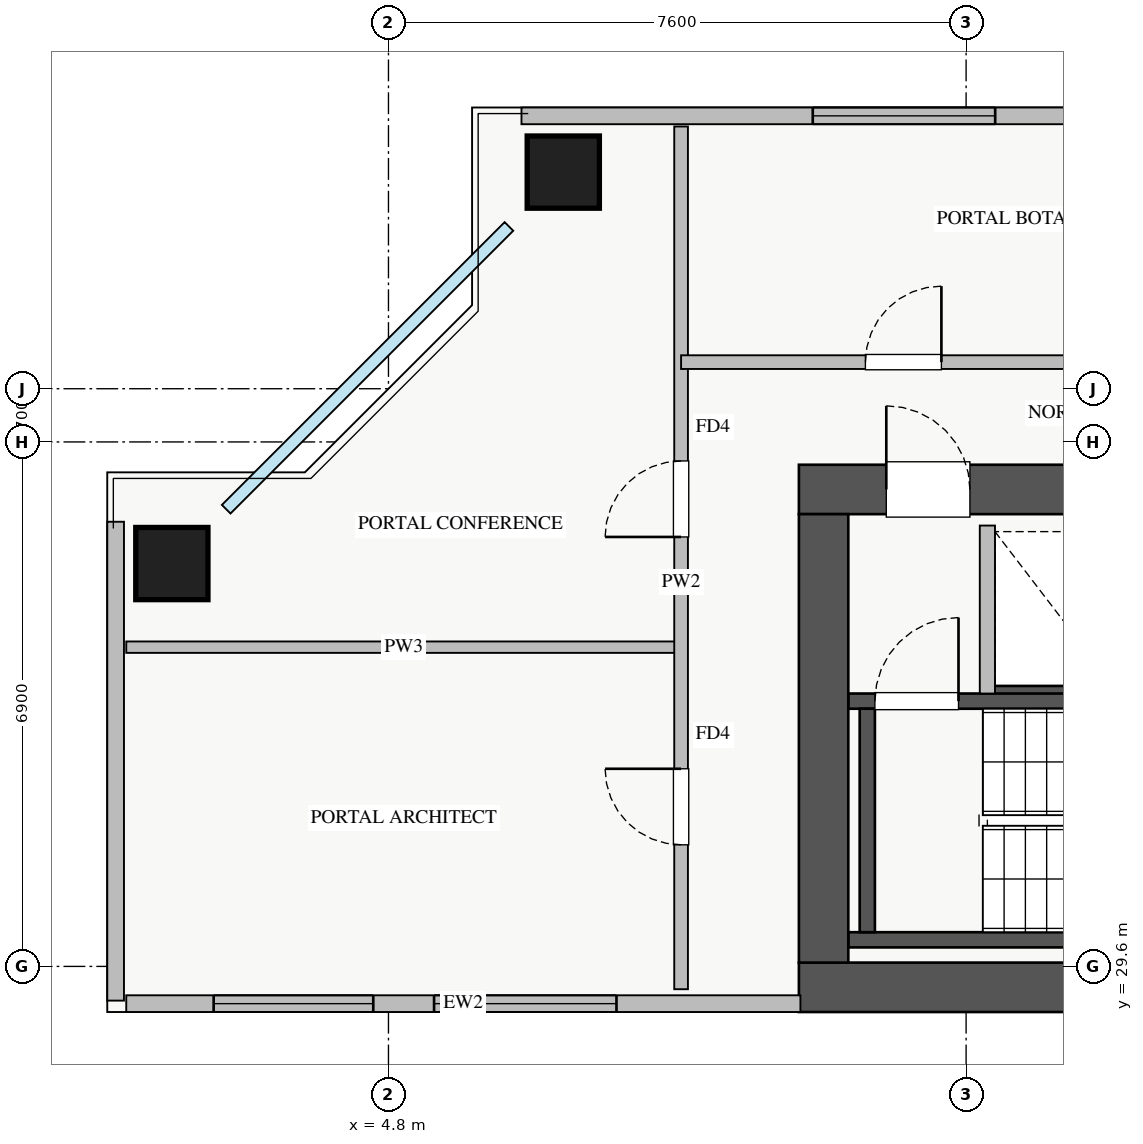
"""IFC4 building model, lengths in metres.
Left out: names, types, materials, properties, quantities, classifications, styles, units other than length and angle.
Written with IfcOpenShell. Run it as: python <this file> out.ifc"""

import sys

from ifc_helpers import new_model, si_unit, direction, frame, frame_2d, origin, origin_2d, place, context, subcontext, project, spatial, rectangle, extrude, source, transform, mapped, element, fill, save


model = new_model("IFC4")
c1 = context("Model", 3, precision=1e-05, world=origin(), true_north=direction((0.0, 1.0)))
c2 = subcontext(c1, "Body", "Model", "MODEL_VIEW")
j1 = project(units=[si_unit("LENGTHUNIT", "METRE"), si_unit("PLANEANGLEUNIT", "RADIAN")], contexts=[c1])
p1 = place(None, origin())
s1 = spatial("IfcSite", under=j1, at=p1, CompositionType="ELEMENT")
p2 = place(p1, origin())
s2 = spatial("IfcBuilding", under=s1, at=p2, CompositionType="ELEMENT")
p3 = place(p2, frame((0.0, 0.0, 166.5)))
s3 = spatial("IfcBuildingStorey", under=s2, at=p3, CompositionType="ELEMENT", Elevation=166.5)
p4 = place(p3, frame((12.68, 33.2, 0.0), z_axis=(0.0, 0.0, 1.0), x_axis=(1.0, 0.0, 0.0)))
e1 = element("IfcWall", 1, at=p4, inside=s3, PredefinedType="SHEAR", context=c2, shape_type="SweptSolid", body=[
    extrude(rectangle(XDim=1.94, YDim=0.18, at=frame_2d((0.97, 0.0))), origin(), (0.0, 0.0, 1.0), 3.07),
])
p5 = place(p3, frame((10.85, 29.95, 0.0), z_axis=(0.0, 0.0, 1.0), x_axis=(1.0, 0.0, 0.0)))
e2 = element("IfcWall", 2, at=p5, inside=s3, PredefinedType="SHEAR", context=c2, shape_type="SweptSolid", body=[
    extrude(rectangle(XDim=7.3, YDim=0.2, at=frame_2d((3.65, 0.0))), origin(), (0.0, 0.0, 1.0), 3.25),
])
p6 = place(p3, frame((10.85, 33.09, 0.0), z_axis=(0.0, 0.0, 1.0), x_axis=(1.0, 0.0, 0.0)))
e3 = element("IfcWall", 3, at=p6, inside=s3, PredefinedType="SHEAR", context=c2, shape_type="SweptSolid", body=[
    extrude(rectangle(XDim=7.3, YDim=0.2, at=frame_2d((3.65, 0.0))), origin(), (0.0, 0.0, 1.0), 3.25),
])
p7 = place(p6, frame((0.35, 0.0, 0.0)))
e4 = element("IfcOpeningElement", 4, at=p7, cuts=e3, PredefinedType="OPENING", context=c2, shape_type="SweptSolid", body=[
    extrude(rectangle(XDim=1.1, YDim=2.05, at=frame_2d((0.55, 1.025))), frame((0.0, 0.11, 0.0), z_axis=(0.0, -1.0, 0.0), x_axis=(1.0, 0.0, 0.0)), (0.0, 0.0, 1.0), 0.22),
])
p8 = place(p3, frame((11.1, 30.05, 0.0), z_axis=(0.0, 0.0, 1.0), x_axis=(0.0, 1.0, 0.0)))
e5 = element("IfcWall", 5, at=p8, inside=s3, PredefinedType="SHEAR", context=c2, shape_type="SweptSolid", body=[
    extrude(rectangle(XDim=2.94, YDim=0.2, at=frame_2d((1.47, 0.0))), origin(), (0.0, 0.0, 1.0), 3.25),
])
p9 = place(p3, frame((10.2, 29.325, 0.0), z_axis=(0.0, 0.0, 1.0), x_axis=(1.0, 0.0, 0.0)))
e6 = element("IfcWall", 6, at=p9, inside=s3, PredefinedType="SHEAR", context=c2, shape_type="SweptSolid", body=[
    extrude(rectangle(XDim=17.6, YDim=0.65, at=frame_2d((8.8, 0.0))), origin(), (0.0, 0.0, 1.0), 3.25),
])
p10 = place(p3, frame((10.2, 35.875, 0.0), z_axis=(0.0, 0.0, 1.0), x_axis=(1.0, 0.0, 0.0)))
e7 = element("IfcWall", 7, at=p10, inside=s3, PredefinedType="SHEAR", context=c2, shape_type="SweptSolid", body=[
    extrude(rectangle(XDim=17.6, YDim=0.65, at=frame_2d((8.8, 0.0))), origin(), (0.0, 0.0, 1.0), 3.25),
])
p11 = place(p10, frame((1.15, 0.0, 0.0)))
e8 = element("IfcOpeningElement", 8, at=p11, cuts=e7, PredefinedType="OPENING", context=c2, shape_type="SweptSolid", body=[
    extrude(rectangle(XDim=1.1, YDim=2.05, at=frame_2d((0.55, 1.025))), frame((0.0, 0.335, 0.0), z_axis=(0.0, -1.0, 0.0), x_axis=(1.0, 0.0, 0.0)), (0.0, 0.0, 1.0), 0.67),
])
p12 = place(p10, frame((8.3, 0.0, 0.0)))
e9 = element("IfcOpeningElement", 9, at=p12, cuts=e7, PredefinedType="OPENING", context=c2, shape_type="SweptSolid", body=[
    extrude(rectangle(XDim=1.1, YDim=2.05, at=frame_2d((0.55, 1.025))), frame((0.0, 0.335, 0.0), z_axis=(0.0, -1.0, 0.0), x_axis=(1.0, 0.0, 0.0)), (0.0, 0.0, 1.0), 0.67),
])
p13 = place(p10, frame((4.9, 0.0, 0.0)))
e10 = element("IfcOpeningElement", 10, at=p13, cuts=e7, PredefinedType="OPENING", context=c2, shape_type="SweptSolid", body=[
    extrude(rectangle(XDim=1.1, YDim=2.05, at=frame_2d((0.55, 1.025))), frame((0.0, 0.335, 0.0), z_axis=(0.0, -1.0, 0.0), x_axis=(1.0, 0.0, 0.0)), (0.0, 0.0, 1.0), 0.67),
])
p14 = place(p10, frame((14.74, 0.0, 0.0)))
e11 = element("IfcOpeningElement", 11, at=p14, cuts=e7, PredefinedType="OPENING", context=c2, shape_type="SweptSolid", body=[
    extrude(rectangle(XDim=1.0, YDim=2.05, at=frame_2d((0.5, 1.025))), frame((0.0, 0.335, 0.0), z_axis=(0.0, -1.0, 0.0), x_axis=(1.0, 0.0, 0.0)), (0.0, 0.0, 1.0), 0.67),
])
p15 = place(p10, frame((10.175, 0.0, 0.0)))
e12 = element("IfcOpeningElement", 12, at=p15, cuts=e7, PredefinedType="OPENING", context=c2, shape_type="SweptSolid", body=[
    extrude(rectangle(XDim=1.0, YDim=2.05, at=frame_2d((0.5, 1.025))), frame((0.0, 0.335, 0.0), z_axis=(0.0, -1.0, 0.0), x_axis=(1.0, 0.0, 0.0)), (0.0, 0.0, 1.0), 0.67),
])
p16 = place(p10, frame((12.625, 0.0, 0.0)))
e13 = element("IfcOpeningElement", 13, at=p16, cuts=e7, PredefinedType="OPENING", context=c2, shape_type="SweptSolid", body=[
    extrude(rectangle(XDim=1.0, YDim=2.05, at=frame_2d((0.5, 1.025))), frame((0.0, 0.335, 0.0), z_axis=(0.0, -1.0, 0.0), x_axis=(1.0, 0.0, 0.0)), (0.0, 0.0, 1.0), 0.67),
])
p17 = place(p3, frame((10.525, 29.65, 0.0), z_axis=(0.0, 0.0, 1.0), x_axis=(0.0, 1.0, 0.0)))
e14 = element("IfcWall", 14, at=p17, inside=s3, PredefinedType="SHEAR", context=c2, shape_type="SweptSolid", body=[
    extrude(rectangle(XDim=5.9, YDim=0.65, at=frame_2d((2.95, 0.0))), origin(), (0.0, 0.0, 1.0), 3.25),
])
m1 = source(origin(), c2, "Body", "SweptSolid", [
    extrude(rectangle(XDim=0.95, YDim=0.95, at=origin_2d()), origin(), (0.0, 0.0, 1.0), 3.25),
])
for number, where, z_axis, x_axis in (
    (15, (7.1, 40.05, 0.0), (0.0, 0.0, 1.0), (1.0, 0.0, 0.0)),
    (16, (1.95, 34.9, 0.0), (0.0, 0.0, 1.0), (1.0, 0.0, 0.0)),
):
    element("IfcColumn", number, at=place(p3, frame(where, z_axis=z_axis, x_axis=x_axis)), inside=s3, PredefinedType="COLUMN", context=c2, shape_type="MappedRepresentation", body=[
        mapped(m1, transform((0.0, 0.0, 0.0), x_axis=(1.0, 0.0, 0.0), y_axis=(0.0, 1.0, 0.0), z_axis=(0.0, 0.0, 1.0), scale=1.0)),
    ])
p18 = place(p3, frame((1.35, 29.11, 0.0), z_axis=(0.0, 0.0, 1.0), x_axis=(1.0, 0.0, 0.0)))
e17 = element("IfcWall", 17, at=p18, inside=s3, PredefinedType="STANDARD", context=c2, shape_type="SweptSolid", body=[
    extrude(rectangle(XDim=8.87, YDim=0.22, at=frame_2d((4.435, 0.0))), origin(), (0.0, 0.0, 1.0), 2.61),
])
p19 = place(p18, frame((1.15, 0.0, 0.9)))
e18 = element("IfcOpeningElement", 18, at=p19, cuts=e17, PredefinedType="OPENING", context=c2, shape_type="SweptSolid", body=[
    extrude(rectangle(XDim=2.1, YDim=1.48, at=frame_2d((1.05, 0.74))), frame((0.0, 0.12, 0.0), z_axis=(0.0, -1.0, 0.0), x_axis=(1.0, 0.0, 0.0)), (0.0, 0.0, 1.0), 0.24),
])
p20 = place(p18, frame((4.05, 0.0, 0.9)))
e19 = element("IfcOpeningElement", 19, at=p20, cuts=e17, PredefinedType="OPENING", context=c2, shape_type="SweptSolid", body=[
    extrude(rectangle(XDim=2.4, YDim=1.5, at=frame_2d((1.2, 0.75))), frame((0.0, 0.12, 0.0), z_axis=(0.0, -1.0, 0.0), x_axis=(1.0, 0.0, 0.0)), (0.0, 0.0, 1.0), 0.24),
])
p21 = place(p3, frame((1.21, 29.15, 0.0), z_axis=(0.0, 0.0, 1.0), x_axis=(0.0, 1.0, 0.0)))
e20 = element("IfcWall", 20, at=p21, inside=s3, PredefinedType="STANDARD", context=c2, shape_type="SweptSolid", body=[
    extrude(rectangle(XDim=6.3, YDim=0.22, at=frame_2d((3.15, 0.0))), origin(), (0.0, 0.0, 1.0), 2.61),
])
p22 = place(p3, frame((6.55, 40.79, 0.0), z_axis=(0.0, 0.0, 1.0), x_axis=(1.0, 0.0, 0.0)))
e21 = element("IfcWall", 21, at=p22, inside=s3, PredefinedType="STANDARD", context=c2, shape_type="SweptSolid", body=[
    extrude(rectangle(XDim=24.9, YDim=0.22, at=frame_2d((12.45, 0.0))), origin(), (0.0, 0.0, 1.0), 2.61),
])
p23 = place(p22, frame((3.833, 0.0, 0.9)))
e22 = element("IfcOpeningElement", 22, at=p23, cuts=e21, PredefinedType="OPENING", context=c2, shape_type="SweptSolid", body=[
    extrude(rectangle(XDim=2.4, YDim=1.5, at=frame_2d((1.2, 0.75))), frame((0.0, 0.12, 0.0), z_axis=(0.0, -1.0, 0.0), x_axis=(1.0, 0.0, 0.0)), (0.0, 0.0, 1.0), 0.24),
])
p24 = place(p22, frame((8.438, 0.0, 0.9)))
e23 = element("IfcOpeningElement", 23, at=p24, cuts=e21, PredefinedType="OPENING", context=c2, shape_type="SweptSolid", body=[
    extrude(rectangle(XDim=1.8, YDim=1.45, at=frame_2d((0.9, 0.725))), frame((0.0, 0.12, 0.0), z_axis=(0.0, -1.0, 0.0), x_axis=(1.0, 0.0, 0.0)), (0.0, 0.0, 1.0), 0.24),
])
p25 = place(p22, frame((14.813, 0.0, 0.9)))
e24 = element("IfcOpeningElement", 24, at=p25, cuts=e21, PredefinedType="OPENING", context=c2, shape_type="SweptSolid", body=[
    extrude(rectangle(XDim=1.5, YDim=1.45, at=frame_2d((0.75, 0.725))), frame((0.0, 0.12, 0.0), z_axis=(0.0, -1.0, 0.0), x_axis=(1.0, 0.0, 0.0)), (0.0, 0.0, 1.0), 0.24),
])
p26 = place(p22, frame((20.738, 0.0, 0.9)))
e25 = element("IfcOpeningElement", 25, at=p26, cuts=e21, PredefinedType="OPENING", context=c2, shape_type="SweptSolid", body=[
    extrude(rectangle(XDim=2.1, YDim=1.48, at=frame_2d((1.05, 0.74))), frame((0.0, 0.12, 0.0), z_axis=(0.0, -1.0, 0.0), x_axis=(1.0, 0.0, 0.0)), (0.0, 0.0, 1.0), 0.24),
])
p27 = place(p3, frame((12.68, 33.19, 0.0), z_axis=(0.0, 0.0, 1.0), x_axis=(0.0, 1.0, 0.0)))
e26 = element("IfcWall", 26, at=p27, inside=s3, PredefinedType="PARTITIONING", context=c2, shape_type="SweptSolid", body=[
    extrude(rectangle(XDim=2.21, YDim=0.2, at=frame_2d((1.105, 0.0))), origin(), (0.0, 0.0, 1.0), 3.07),
])
p28 = place(p3, frame((1.35, 33.8, 0.0), z_axis=(0.0, 0.0, 1.0), x_axis=(1.0, 0.0, 0.0)))
e27 = element("IfcWall", 27, at=p28, inside=s3, PredefinedType="PARTITIONING", context=c2, shape_type="SweptSolid", body=[
    extrude(rectangle(XDim=7.3, YDim=0.15, at=frame_2d((3.65, 0.0))), origin(), (0.0, 0.0, 1.0), 3.07),
])
p29 = place(p3, frame((8.65, 29.3, 0.0), z_axis=(0.0, 0.0, 1.0), x_axis=(0.0, 1.0, 0.0)))
e28 = element("IfcWall", 28, at=p29, inside=s3, PredefinedType="PARTITIONING", context=c2, shape_type="SweptSolid", body=[
    extrude(rectangle(XDim=11.35, YDim=0.18, at=frame_2d((5.675, 0.0))), origin(), (0.0, 0.0, 1.0), 3.07),
])
p30 = place(p29, frame((1.9, 0.0, 0.0)))
e29 = element("IfcOpeningElement", 29, at=p30, cuts=e28, PredefinedType="OPENING", context=c2, shape_type="SweptSolid", body=[
    extrude(rectangle(XDim=1.0, YDim=2.05, at=frame_2d((0.5, 1.025))), frame((0.0, 0.1, 0.0), z_axis=(0.0, -1.0, 0.0), x_axis=(1.0, 0.0, 0.0)), (0.0, 0.0, 1.0), 0.2),
])
p31 = place(p29, frame((5.95, 0.0, 0.0)))
e30 = element("IfcOpeningElement", 30, at=p31, cuts=e28, PredefinedType="OPENING", context=c2, shape_type="SweptSolid", body=[
    extrude(rectangle(XDim=1.0, YDim=2.05, at=frame_2d((0.5, 1.025))), frame((0.0, 0.1, 0.0), z_axis=(0.0, -1.0, 0.0), x_axis=(1.0, 0.0, 0.0)), (0.0, 0.0, 1.0), 0.2),
])
p32 = place(p3, frame((8.65, 37.55, 0.0), z_axis=(0.0, 0.0, 1.0), x_axis=(1.0, 0.0, 0.0)))
e31 = element("IfcWall", 31, at=p32, inside=s3, PredefinedType="PARTITIONING", context=c2, shape_type="SweptSolid", body=[
    extrude(rectangle(XDim=23.8, YDim=0.18, at=frame_2d((11.9, 0.0))), origin(), (0.0, 0.0, 1.0), 3.07),
])
p33 = place(p32, frame((2.425, 0.0, 0.0)))
e32 = element("IfcOpeningElement", 32, at=p33, cuts=e31, PredefinedType="OPENING", context=c2, shape_type="SweptSolid", body=[
    extrude(rectangle(XDim=1.0, YDim=2.05, at=frame_2d((0.5, 1.025))), frame((0.0, 0.1, 0.0), z_axis=(0.0, -1.0, 0.0), x_axis=(1.0, 0.0, 0.0)), (0.0, 0.0, 1.0), 0.2),
])
p34 = place(p32, frame((8.35, 0.0, 0.0)))
e33 = element("IfcOpeningElement", 33, at=p34, cuts=e31, PredefinedType="OPENING", context=c2, shape_type="SweptSolid", body=[
    extrude(rectangle(XDim=1.0, YDim=2.05, at=frame_2d((0.5, 1.025))), frame((0.0, 0.1, 0.0), z_axis=(0.0, -1.0, 0.0), x_axis=(1.0, 0.0, 0.0)), (0.0, 0.0, 1.0), 0.2),
])
p35 = place(p32, frame((14.35, 0.0, 0.0)))
e34 = element("IfcOpeningElement", 34, at=p35, cuts=e31, PredefinedType="OPENING", context=c2, shape_type="SweptSolid", body=[
    extrude(rectangle(XDim=1.0, YDim=2.05, at=frame_2d((0.5, 1.025))), frame((0.0, 0.1, 0.0), z_axis=(0.0, -1.0, 0.0), x_axis=(1.0, 0.0, 0.0)), (0.0, 0.0, 1.0), 0.2),
])
p36 = place(p32, frame((20.325, 0.0, 0.0)))
e35 = element("IfcOpeningElement", 35, at=p36, cuts=e31, PredefinedType="OPENING", context=c2, shape_type="SweptSolid", body=[
    extrude(rectangle(XDim=1.0, YDim=2.05, at=frame_2d((0.5, 1.025))), frame((0.0, 0.1, 0.0), z_axis=(0.0, -1.0, 0.0), x_axis=(1.0, 0.0, 0.0)), (0.0, 0.0, 1.0), 0.2),
])
m2 = source(origin(), c2, "Body", "SweptSolid", [
    extrude(rectangle(XDim=2.1, YDim=1.48, at=frame_2d((1.05, 0.74))), frame((0.0, 0.03, 0.0), z_axis=(0.0, -1.0, 0.0), x_axis=(1.0, 0.0, 0.0)), (0.0, 0.0, 1.0), 0.06),
])
p37 = place(p19, origin())
e36 = element("IfcWindow", 36, at=p37, inside=s3, PartitioningType="TRIPLE_PANEL_VERTICAL", PredefinedType="WINDOW", context=c2, shape_type="MappedRepresentation", body=[
    mapped(m2, transform((0.0, 0.0, 0.0), x_axis=(1.0, 0.0, 0.0), y_axis=(0.0, 1.0, 0.0), z_axis=(0.0, 0.0, 1.0), scale=1.0)),
])
fill(e18, e36)
m3 = source(origin(), c2, "Body", "SweptSolid", [
    extrude(rectangle(XDim=2.4, YDim=1.5, at=frame_2d((1.2, 0.75))), frame((0.0, 0.03, 0.0), z_axis=(0.0, -1.0, 0.0), x_axis=(1.0, 0.0, 0.0)), (0.0, 0.0, 1.0), 0.06),
])
p38 = place(p20, origin())
e37 = element("IfcWindow", 37, at=p38, inside=s3, PartitioningType="TRIPLE_PANEL_VERTICAL", PredefinedType="WINDOW", context=c2, shape_type="MappedRepresentation", body=[
    mapped(m3, transform((0.0, 0.0, 0.0), x_axis=(1.0, 0.0, 0.0), y_axis=(0.0, 1.0, 0.0), z_axis=(0.0, 0.0, 1.0), scale=1.0)),
])
fill(e19, e37)
p39 = place(p23, origin())
e38 = element("IfcWindow", 38, at=p39, inside=s3, PartitioningType="TRIPLE_PANEL_VERTICAL", PredefinedType="WINDOW", context=c2, shape_type="MappedRepresentation", body=[
    mapped(m3, transform((0.0, 0.0, 0.0), x_axis=(1.0, 0.0, 0.0), y_axis=(0.0, 1.0, 0.0), z_axis=(0.0, 0.0, 1.0), scale=1.0)),
])
fill(e22, e38)
m4 = source(origin(), c2, "Body", "SweptSolid", [
    extrude(rectangle(XDim=1.1, YDim=2.05, at=frame_2d((0.55, 1.025))), frame((0.0, 0.025, 0.0), z_axis=(0.0, -1.0, 0.0), x_axis=(1.0, 0.0, 0.0)), (0.0, 0.0, 1.0), 0.05),
])
p40 = place(p11, origin())
e39 = element("IfcDoor", 39, at=p40, inside=s3, OperationType="SINGLE_SWING_LEFT", PredefinedType="DOOR", context=c2, shape_type="MappedRepresentation", body=[
    mapped(m4, transform((0.0, 0.0, 0.0), x_axis=(1.0, 0.0, 0.0), y_axis=(0.0, 1.0, 0.0), z_axis=(0.0, 0.0, 1.0), scale=1.0)),
])
fill(e8, e39)
p41 = place(p7, origin())
e40 = element("IfcDoor", 40, at=p41, inside=s3, OperationType="SINGLE_SWING_RIGHT", PredefinedType="DOOR", context=c2, shape_type="MappedRepresentation", body=[
    mapped(m4, transform((0.0, 0.0, 0.0), x_axis=(1.0, 0.0, 0.0), y_axis=(0.0, 1.0, 0.0), z_axis=(0.0, 0.0, 1.0), scale=1.0)),
])
fill(e4, e40)
m5 = source(origin(), c2, "Body", "SweptSolid", [
    extrude(rectangle(XDim=1.0, YDim=2.05, at=frame_2d((0.5, 1.025))), frame((0.0, 0.025, 0.0), z_axis=(0.0, -1.0, 0.0), x_axis=(1.0, 0.0, 0.0)), (0.0, 0.0, 1.0), 0.05),
])
p42 = place(p30, origin())
e41 = element("IfcDoor", 41, at=p42, inside=s3, OperationType="SINGLE_SWING_RIGHT", PredefinedType="DOOR", context=c2, shape_type="MappedRepresentation", body=[
    mapped(m5, transform((0.0, 0.0, 0.0), x_axis=(1.0, 0.0, 0.0), y_axis=(0.0, 1.0, 0.0), z_axis=(0.0, 0.0, 1.0), scale=1.0)),
])
fill(e29, e41)
p43 = place(p31, origin())
e42 = element("IfcDoor", 42, at=p43, inside=s3, OperationType="SINGLE_SWING_LEFT", PredefinedType="DOOR", context=c2, shape_type="MappedRepresentation", body=[
    mapped(m5, transform((0.0, 0.0, 0.0), x_axis=(1.0, 0.0, 0.0), y_axis=(0.0, 1.0, 0.0), z_axis=(0.0, 0.0, 1.0), scale=1.0)),
])
fill(e30, e42)
p44 = place(p33, origin())
e43 = element("IfcDoor", 43, at=p44, inside=s3, OperationType="SINGLE_SWING_RIGHT", PredefinedType="DOOR", context=c2, shape_type="MappedRepresentation", body=[
    mapped(m5, transform((0.0, 0.0, 0.0), x_axis=(1.0, 0.0, 0.0), y_axis=(0.0, 1.0, 0.0), z_axis=(0.0, 0.0, 1.0), scale=1.0)),
])
fill(e32, e43)
save(model, sys.argv[1])
